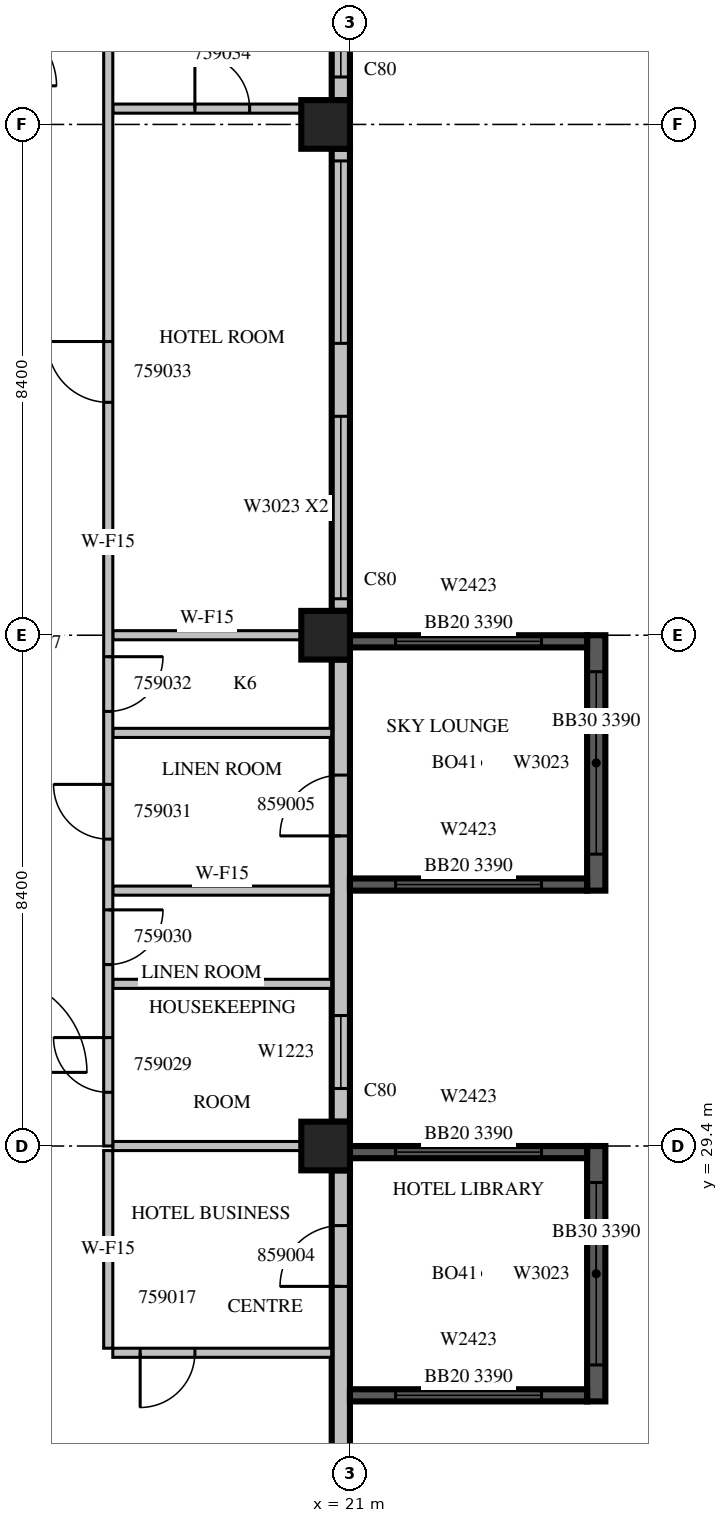
"""IFC4 building model, lengths in metres.
Left out: names, types, materials, properties, quantities, classifications, styles, units other than length and angle.
Written with IfcOpenShell. Run it as: python <this file> out.ifc"""

import sys

from ifc_helpers import new_model, si_unit, direction, frame, frame_2d, origin, origin_2d, place, context, subcontext, project, spatial, rectangle, extrude, source, transform, mapped, element, fill, save


model = new_model("IFC4")
c1 = context("Model", 3, precision=1e-05, world=origin(), true_north=direction((0.0, 1.0)))
c2 = subcontext(c1, "Body", "Model", "MODEL_VIEW")
j1 = project(units=[si_unit("LENGTHUNIT", "METRE"), si_unit("PLANEANGLEUNIT", "RADIAN")], contexts=[c1])
p1 = place(None, origin())
s1 = spatial("IfcSite", under=j1, at=p1, CompositionType="ELEMENT")
p2 = place(p1, origin())
s2 = spatial("IfcBuilding", under=s1, at=p2, CompositionType="ELEMENT")
p3 = place(p2, frame((0.0, 0.0, 257.6)))
s3 = spatial("IfcBuildingStorey", under=s2, at=p3, CompositionType="ELEMENT", Elevation=257.6)
m1 = source(origin(), c2, "Body", "SweptSolid", [
    extrude(rectangle(XDim=0.8, YDim=0.8, at=origin_2d()), origin(), (0.0, 0.0, 1.0), 3.8),
])
for number, where, z_axis, x_axis in (
    (1, (20.6, 29.4, 0.0), (0.0, 0.0, 1.0), (1.0, 0.0, 0.0)),
    (2, (20.6, 37.8, 0.0), (0.0, 0.0, 1.0), (1.0, 0.0, 0.0)),
    (3, (20.6, 46.2, 0.0), (0.0, 0.0, 1.0), (1.0, 0.0, 0.0)),
):
    element("IfcColumn", number, at=place(p3, frame(where, z_axis=z_axis, x_axis=x_axis)), inside=s3, PredefinedType="COLUMN", context=c2, shape_type="MappedRepresentation", body=[
        mapped(m1, transform((0.0, 0.0, 0.0), scale=1.0)),
    ])
m2 = source(origin(), c2, "Body", "SweptSolid", [
    extrude(rectangle(XDim=7.2, YDim=0.3, at=frame_2d((3.6, 0.0))), origin(), (0.0, 0.0, 1.0), 3.4),
])
p4 = place(p3, frame((20.85, 21.8, 0.0), z_axis=(0.0, 0.0, 1.0), x_axis=(0.0, 1.0, 0.0)))
e4 = element("IfcWall", 4, at=p4, inside=s3, PredefinedType="STANDARD", context=c2, shape_type="MappedRepresentation", body=[
    mapped(m2, transform((0.0, 0.0, 0.0), scale=1.0)),
])
m3 = source(origin(), c2, "Body", "SweptSolid", [
    extrude(rectangle(XDim=1.8, YDim=2.3, at=frame_2d((0.9, 1.15))), frame((0.0, 0.16, 0.0), z_axis=(0.0, -1.0, 0.0), x_axis=(1.0, 0.0, 0.0)), (0.0, 0.0, 1.0), 0.32),
])
p5 = place(p4, frame((0.4, 0.0, 0.6)))
e5 = element("IfcOpeningElement", 5, at=p5, cuts=e4, PredefinedType="OPENING", context=c2, shape_type="MappedRepresentation", body=[
    mapped(m3, transform((0.0, 0.0, 0.0), scale=1.0)),
])
m4 = source(origin(), c2, "Body", "SweptSolid", [
    extrude(rectangle(XDim=1.0, YDim=2.1, at=frame_2d((0.5, 1.05))), frame((0.0, 0.16, 0.0), z_axis=(0.0, -1.0, 0.0), x_axis=(1.0, 0.0, 0.0)), (0.0, 0.0, 1.0), 0.32),
])
p6 = place(p4, frame((5.292, 0.0, 0.0)))
e6 = element("IfcOpeningElement", 6, at=p6, cuts=e4, PredefinedType="OPENING", context=c2, shape_type="MappedRepresentation", body=[
    mapped(m4, transform((0.0, 0.0, 0.0), scale=1.0)),
])
m5 = source(origin(), c2, "Body", "SweptSolid", [
    extrude(rectangle(XDim=7.6, YDim=0.3, at=frame_2d((3.8, 0.0))), origin(), (0.0, 0.0, 1.0), 3.4),
])
p7 = place(p3, frame((20.85, 29.8, 0.0), z_axis=(0.0, 0.0, 1.0), x_axis=(0.0, 1.0, 0.0)))
e7 = element("IfcWall", 7, at=p7, inside=s3, PredefinedType="STANDARD", context=c2, shape_type="MappedRepresentation", body=[
    mapped(m5, transform((0.0, 0.0, 0.0), scale=1.0)),
])
m6 = source(origin(), c2, "Body", "SweptSolid", [
    extrude(rectangle(XDim=1.2, YDim=2.3, at=frame_2d((0.6, 1.15))), frame((0.0, 0.16, 0.0), z_axis=(0.0, -1.0, 0.0), x_axis=(1.0, 0.0, 0.0)), (0.0, 0.0, 1.0), 0.32),
])
p8 = place(p7, frame((0.546, 0.0, 0.6)))
e8 = element("IfcOpeningElement", 8, at=p8, cuts=e7, PredefinedType="OPENING", context=c2, shape_type="MappedRepresentation", body=[
    mapped(m6, transform((0.0, 0.0, 0.0), scale=1.0)),
])
p9 = place(p7, frame((4.7, 0.0, 0.0)))
e9 = element("IfcOpeningElement", 9, at=p9, cuts=e7, PredefinedType="OPENING", context=c2, shape_type="MappedRepresentation", body=[
    mapped(m4, transform((0.0, 0.0, 0.0), scale=1.0)),
])
p10 = place(p3, frame((20.85, 38.2, 0.0), z_axis=(0.0, 0.0, 1.0), x_axis=(0.0, 1.0, 0.0)))
e10 = element("IfcWall", 10, at=p10, inside=s3, PredefinedType="STANDARD", context=c2, shape_type="MappedRepresentation", body=[
    mapped(m5, transform((0.0, 0.0, 0.0), scale=1.0)),
])
m7 = source(origin(), c2, "Body", "SweptSolid", [
    extrude(rectangle(XDim=3.0, YDim=2.3, at=frame_2d((1.5, 1.15))), frame((0.0, 0.16, 0.0), z_axis=(0.0, -1.0, 0.0), x_axis=(1.0, 0.0, 0.0)), (0.0, 0.0, 1.0), 0.32),
])
p11 = place(p10, frame((0.2, 0.0, 0.6)))
e11 = element("IfcOpeningElement", 11, at=p11, cuts=e10, PredefinedType="OPENING", context=c2, shape_type="MappedRepresentation", body=[
    mapped(m7, transform((0.0, 0.0, 0.0), scale=1.0)),
])
p12 = place(p10, frame((4.4, 0.0, 0.6)))
e12 = element("IfcOpeningElement", 12, at=p12, cuts=e10, PredefinedType="OPENING", context=c2, shape_type="MappedRepresentation", body=[
    mapped(m7, transform((0.0, 0.0, 0.0), scale=1.0)),
])
m8 = source(origin(), c2, "Body", "SweptSolid", [
    extrude(rectangle(XDim=2.96, YDim=0.3, at=frame_2d((1.48, 0.0))), origin(), (0.0, 0.0, 1.0), 3.4),
])
p13 = place(p3, frame((20.85, 46.6, 0.0), z_axis=(0.0, 0.0, 1.0), x_axis=(0.0, 1.0, 0.0)))
e13 = element("IfcWall", 13, at=p13, inside=s3, PredefinedType="STANDARD", context=c2, shape_type="MappedRepresentation", body=[
    mapped(m8, transform((0.0, 0.0, 0.0), scale=1.0)),
])
p14 = place(p13, frame((0.38, 0.0, 0.6)))
e14 = element("IfcOpeningElement", 14, at=p14, cuts=e13, PredefinedType="OPENING", context=c2, shape_type="MappedRepresentation", body=[
    mapped(m3, transform((0.0, 0.0, 0.0), scale=1.0)),
])
m9 = source(origin(), c2, "Body", "SweptSolid", [
    extrude(rectangle(XDim=4.2, YDim=0.3, at=frame_2d((2.1, 0.0))), origin(), (0.0, 0.0, 1.0), 3.39),
])
p15 = place(p3, frame((25.05, 25.2, 0.0), z_axis=(0.0, 0.0, 1.0), x_axis=(0.0, 1.0, 0.0)))
e15 = element("IfcWall", 15, at=p15, inside=s3, PredefinedType="SOLIDWALL", context=c2, shape_type="MappedRepresentation", body=[
    mapped(m9, transform((0.0, 0.0, 0.0), scale=1.0)),
])
p16 = place(p15, frame((0.6, 0.0, 0.6)))
e16 = element("IfcOpeningElement", 16, at=p16, cuts=e15, PredefinedType="OPENING", context=c2, shape_type="MappedRepresentation", body=[
    mapped(m7, transform((0.0, 0.0, 0.0), scale=1.0)),
])
m10 = source(origin(), c2, "Body", "SweptSolid", [
    extrude(rectangle(XDim=3.9, YDim=0.2, at=frame_2d((1.95, 0.0))), origin(), (0.0, 0.0, 1.0), 3.39),
])
p17 = place(p3, frame((21.0, 25.3, 0.0), z_axis=(0.0, 0.0, 1.0), x_axis=(1.0, 0.0, 0.0)))
e17 = element("IfcWall", 17, at=p17, inside=s3, PredefinedType="SOLIDWALL", context=c2, shape_type="MappedRepresentation", body=[
    mapped(m10, transform((0.0, 0.0, 0.0), scale=1.0)),
])
m11 = source(origin(), c2, "Body", "SweptSolid", [
    extrude(rectangle(XDim=2.4, YDim=2.3, at=frame_2d((1.2, 1.15))), frame((0.0, 0.11, 0.0), z_axis=(0.0, -1.0, 0.0), x_axis=(1.0, 0.0, 0.0)), (0.0, 0.0, 1.0), 0.22),
])
p18 = place(p17, frame((0.75, 0.0, 0.6)))
e18 = element("IfcOpeningElement", 18, at=p18, cuts=e17, PredefinedType="OPENING", context=c2, shape_type="MappedRepresentation", body=[
    mapped(m11, transform((0.0, 0.0, 0.0), scale=1.0)),
])
p19 = place(p3, frame((21.0, 29.3, 0.0), z_axis=(0.0, 0.0, 1.0), x_axis=(1.0, 0.0, 0.0)))
e19 = element("IfcWall", 19, at=p19, inside=s3, PredefinedType="SOLIDWALL", context=c2, shape_type="MappedRepresentation", body=[
    mapped(m10, transform((0.0, 0.0, 0.0), scale=1.0)),
])
p20 = place(p19, frame((0.75, 0.0, 0.6)))
e20 = element("IfcOpeningElement", 20, at=p20, cuts=e19, PredefinedType="OPENING", context=c2, shape_type="MappedRepresentation", body=[
    mapped(m11, transform((0.0, 0.0, 0.0), scale=1.0)),
])
p21 = place(p3, frame((25.05, 33.6, 0.0), z_axis=(0.0, 0.0, 1.0), x_axis=(0.0, 1.0, 0.0)))
e21 = element("IfcWall", 21, at=p21, inside=s3, PredefinedType="SOLIDWALL", context=c2, shape_type="MappedRepresentation", body=[
    mapped(m9, transform((0.0, 0.0, 0.0), scale=1.0)),
])
p22 = place(p21, frame((0.6, 0.0, 0.6)))
e22 = element("IfcOpeningElement", 22, at=p22, cuts=e21, PredefinedType="OPENING", context=c2, shape_type="MappedRepresentation", body=[
    mapped(m7, transform((0.0, 0.0, 0.0), scale=1.0)),
])
p23 = place(p3, frame((21.0, 33.7, 0.0), z_axis=(0.0, 0.0, 1.0), x_axis=(1.0, 0.0, 0.0)))
e23 = element("IfcWall", 23, at=p23, inside=s3, PredefinedType="SOLIDWALL", context=c2, shape_type="MappedRepresentation", body=[
    mapped(m10, transform((0.0, 0.0, 0.0), scale=1.0)),
])
p24 = place(p23, frame((0.75, 0.0, 0.6)))
e24 = element("IfcOpeningElement", 24, at=p24, cuts=e23, PredefinedType="OPENING", context=c2, shape_type="MappedRepresentation", body=[
    mapped(m11, transform((0.0, 0.0, 0.0), scale=1.0)),
])
p25 = place(p3, frame((21.0, 37.7, 0.0), z_axis=(0.0, 0.0, 1.0), x_axis=(1.0, 0.0, 0.0)))
e25 = element("IfcWall", 25, at=p25, inside=s3, PredefinedType="SOLIDWALL", context=c2, shape_type="MappedRepresentation", body=[
    mapped(m10, transform((0.0, 0.0, 0.0), scale=1.0)),
])
p26 = place(p25, frame((0.75, 0.0, 0.6)))
e26 = element("IfcOpeningElement", 26, at=p26, cuts=e25, PredefinedType="OPENING", context=c2, shape_type="MappedRepresentation", body=[
    mapped(m11, transform((0.0, 0.0, 0.0), scale=1.0)),
])
m12 = source(origin(), c2, "Body", "SweptSolid", [
    extrude(rectangle(XDim=3.6, YDim=0.15, at=frame_2d((1.8, 0.0))), origin(), (0.0, 0.0, 1.0), 3.4),
])
p27 = place(p3, frame((17.1, 26.0, 0.0), z_axis=(0.0, 0.0, 1.0), x_axis=(1.0, 0.0, 0.0)))
e27 = element("IfcWall", 27, at=p27, inside=s3, PredefinedType="PARTITIONING", context=c2, shape_type="MappedRepresentation", body=[
    mapped(m12, transform((0.0, 0.0, 0.0), scale=1.0)),
])
m13 = source(origin(), c2, "Body", "SweptSolid", [
    extrude(rectangle(XDim=0.9, YDim=2.1, at=frame_2d((0.45, 1.05))), frame((0.0, 0.085, 0.0), z_axis=(0.0, -1.0, 0.0), x_axis=(1.0, 0.0, 0.0)), (0.0, 0.0, 1.0), 0.17),
])
p28 = place(p27, frame((0.45, 0.0, 0.0)))
e28 = element("IfcOpeningElement", 28, at=p28, cuts=e27, PredefinedType="OPENING", context=c2, shape_type="MappedRepresentation", body=[
    mapped(m13, transform((0.0, 0.0, 0.0), scale=1.0)),
])
m14 = source(origin(), c2, "Body", "SweptSolid", [
    extrude(rectangle(XDim=3.25, YDim=0.15, at=frame_2d((1.625, 0.0))), origin(), (0.0, 0.0, 1.0), 3.4),
])
p29 = place(p3, frame((17.025, 29.325, 0.0), z_axis=(0.0, 0.0, 1.0), x_axis=(0.0, -1.0, 0.0)))
e29 = element("IfcWall", 29, at=p29, inside=s3, PredefinedType="PARTITIONING", context=c2, shape_type="MappedRepresentation", body=[
    mapped(m14, transform((0.0, 0.0, 0.0), scale=1.0)),
])
m15 = source(origin(), c2, "Body", "SweptSolid", [
    extrude(rectangle(XDim=3.101, YDim=0.15, at=frame_2d((1.55, 0.0))), origin(), (0.0, 0.0, 1.0), 3.4),
])
p30 = place(p3, frame((20.201, 29.4, 0.0), z_axis=(0.0, 0.0, 1.0), x_axis=(-1.0, 0.0, 0.0)))
e30 = element("IfcWall", 30, at=p30, inside=s3, PredefinedType="PARTITIONING", context=c2, shape_type="MappedRepresentation", body=[
    mapped(m15, transform((0.0, 0.0, 0.0), scale=1.0)),
])
for number, where, z_axis, x_axis in (
    (31, (17.1, 32.067, 0.0), (0.0, 0.0, 1.0), (1.0, 0.0, 0.0)),
    (32, (17.1, 36.194, 0.0), (0.0, 0.0, 1.0), (1.0, 0.0, 0.0)),
):
    element("IfcWall", number, at=place(p3, frame(where, z_axis=z_axis, x_axis=x_axis)), inside=s3, PredefinedType="PARTITIONING", context=c2, shape_type="MappedRepresentation", body=[
        mapped(m12, transform((0.0, 0.0, 0.0), scale=1.0)),
    ])
p31 = place(p3, frame((17.1, 46.46, 0.0), z_axis=(0.0, 0.0, 1.0), x_axis=(1.0, 0.0, 0.0)))
e33 = element("IfcWall", 33, at=p31, inside=s3, PredefinedType="PARTITIONING", context=c2, shape_type="MappedRepresentation", body=[
    mapped(m15, transform((0.0, 0.0, 0.0), scale=1.0)),
])
p32 = place(p31, frame((1.35, 0.0, 0.0)))
e34 = element("IfcOpeningElement", 34, at=p32, cuts=e33, PredefinedType="OPENING", context=c2, shape_type="MappedRepresentation", body=[
    mapped(m13, transform((0.0, 0.0, 0.0), scale=1.0)),
])
p33 = place(p3, frame((20.7, 33.6, 0.0), z_axis=(0.0, 0.0, 1.0), x_axis=(-1.0, 0.0, 0.0)))
e35 = element("IfcWall", 35, at=p33, inside=s3, PredefinedType="PARTITIONING", context=c2, shape_type="MappedRepresentation", body=[
    mapped(m12, transform((0.0, 0.0, 0.0), scale=1.0)),
])
p34 = place(p3, frame((20.201, 37.8, 0.0), z_axis=(0.0, 0.0, 1.0), x_axis=(-1.0, 0.0, 0.0)))
e36 = element("IfcWall", 36, at=p34, inside=s3, PredefinedType="PARTITIONING", context=c2, shape_type="MappedRepresentation", body=[
    mapped(m15, transform((0.0, 0.0, 0.0), scale=1.0)),
])
m16 = source(origin(), c2, "Body", "SweptSolid", [
    extrude(rectangle(XDim=19.86, YDim=0.15, at=frame_2d((9.93, 0.0))), origin(), (0.0, 0.0, 1.0), 3.4),
])
p35 = place(p3, frame((17.025, 49.26, 0.0), z_axis=(0.0, 0.0, 1.0), x_axis=(0.0, -1.0, 0.0)))
e37 = element("IfcWall", 37, at=p35, inside=s3, PredefinedType="PARTITIONING", context=c2, shape_type="MappedRepresentation", body=[
    mapped(m16, transform((0.0, 0.0, 0.0), scale=1.0)),
])
p36 = place(p35, frame((18.076, 0.0, 0.0)))
e38 = element("IfcOpeningElement", 38, at=p36, cuts=e37, PredefinedType="OPENING", context=c2, shape_type="MappedRepresentation", body=[
    mapped(m13, transform((0.0, 0.0, 0.0), scale=1.0)),
])
p37 = place(p35, frame((15.976, 0.0, 0.0)))
e39 = element("IfcOpeningElement", 39, at=p37, cuts=e37, PredefinedType="OPENING", context=c2, shape_type="MappedRepresentation", body=[
    mapped(m13, transform((0.0, 0.0, 0.0), scale=1.0)),
])
p38 = place(p35, frame((13.913, 0.0, 0.0)))
e40 = element("IfcOpeningElement", 40, at=p38, cuts=e37, PredefinedType="OPENING", context=c2, shape_type="MappedRepresentation", body=[
    mapped(m13, transform((0.0, 0.0, 0.0), scale=1.0)),
])
p39 = place(p35, frame((11.813, 0.0, 0.0)))
e41 = element("IfcOpeningElement", 41, at=p39, cuts=e37, PredefinedType="OPENING", context=c2, shape_type="MappedRepresentation", body=[
    mapped(m13, transform((0.0, 0.0, 0.0), scale=1.0)),
])
m17 = source(origin(), c2, "Body", "SweptSolid", [
    extrude(rectangle(XDim=1.0, YDim=2.1, at=frame_2d((0.5, 1.05))), frame((0.0, 0.085, 0.0), z_axis=(0.0, -1.0, 0.0), x_axis=(1.0, 0.0, 0.0)), (0.0, 0.0, 1.0), 0.17),
])
p40 = place(p35, frame((6.63, 0.0, 0.0)))
e42 = element("IfcOpeningElement", 42, at=p40, cuts=e37, PredefinedType="OPENING", context=c2, shape_type="MappedRepresentation", body=[
    mapped(m17, transform((0.0, 0.0, 0.0), scale=1.0)),
])
m18 = source(origin(), c2, "Body", "SweptSolid", [
    extrude(rectangle(XDim=1.2, YDim=2.3, at=frame_2d((0.6, 1.15))), frame((0.0, 0.03, 0.0), z_axis=(0.0, -1.0, 0.0), x_axis=(1.0, 0.0, 0.0)), (0.0, 0.0, 1.0), 0.06),
])
p41 = place(p8, origin())
e43 = element("IfcWindow", 43, at=p41, inside=s3, PartitioningType="SINGLE_PANEL", PredefinedType="WINDOW", context=c2, shape_type="MappedRepresentation", body=[
    mapped(m18, transform((0.0, 0.0, 0.0), scale=1.0)),
])
fill(e8, e43)
m19 = source(origin(), c2, "Body", "SweptSolid", [
    extrude(rectangle(XDim=3.0, YDim=2.3, at=frame_2d((1.5, 1.15))), frame((0.0, 0.03, 0.0), z_axis=(0.0, -1.0, 0.0), x_axis=(1.0, 0.0, 0.0)), (0.0, 0.0, 1.0), 0.06),
])
p42 = place(p11, origin())
e44 = element("IfcWindow", 44, at=p42, inside=s3, PartitioningType="SINGLE_PANEL", PredefinedType="WINDOW", context=c2, shape_type="MappedRepresentation", body=[
    mapped(m19, transform((0.0, 0.0, 0.0), scale=1.0)),
])
fill(e11, e44)
p43 = place(p12, origin())
e45 = element("IfcWindow", 45, at=p43, inside=s3, PartitioningType="SINGLE_PANEL", PredefinedType="WINDOW", context=c2, shape_type="MappedRepresentation", body=[
    mapped(m19, transform((0.0, 0.0, 0.0), scale=1.0)),
])
fill(e12, e45)
m20 = source(origin(), c2, "Body", "SweptSolid", [
    extrude(rectangle(XDim=1.8, YDim=2.3, at=frame_2d((0.9, 1.15))), frame((0.0, 0.03, 0.0), z_axis=(0.0, -1.0, 0.0), x_axis=(1.0, 0.0, 0.0)), (0.0, 0.0, 1.0), 0.06),
])
p44 = place(p14, origin())
e46 = element("IfcWindow", 46, at=p44, inside=s3, PartitioningType="SINGLE_PANEL", PredefinedType="WINDOW", context=c2, shape_type="MappedRepresentation", body=[
    mapped(m20, transform((0.0, 0.0, 0.0), scale=1.0)),
])
fill(e14, e46)
p45 = place(p16, origin())
e47 = element("IfcWindow", 47, at=p45, inside=s3, PartitioningType="SINGLE_PANEL", PredefinedType="WINDOW", context=c2, shape_type="MappedRepresentation", body=[
    mapped(m19, transform((0.0, 0.0, 0.0), scale=1.0)),
])
fill(e16, e47)
m21 = source(origin(), c2, "Body", "SweptSolid", [
    extrude(rectangle(XDim=2.4, YDim=2.3, at=frame_2d((1.2, 1.15))), frame((0.0, 0.03, 0.0), z_axis=(0.0, -1.0, 0.0), x_axis=(1.0, 0.0, 0.0)), (0.0, 0.0, 1.0), 0.06),
])
p46 = place(p18, origin())
e48 = element("IfcWindow", 48, at=p46, inside=s3, PartitioningType="SINGLE_PANEL", PredefinedType="WINDOW", context=c2, shape_type="MappedRepresentation", body=[
    mapped(m21, transform((0.0, 0.0, 0.0), scale=1.0)),
])
fill(e18, e48)
p47 = place(p20, origin())
e49 = element("IfcWindow", 49, at=p47, inside=s3, PartitioningType="SINGLE_PANEL", PredefinedType="WINDOW", context=c2, shape_type="MappedRepresentation", body=[
    mapped(m21, transform((0.0, 0.0, 0.0), scale=1.0)),
])
fill(e20, e49)
p48 = place(p22, origin())
e50 = element("IfcWindow", 50, at=p48, inside=s3, PartitioningType="SINGLE_PANEL", PredefinedType="WINDOW", context=c2, shape_type="MappedRepresentation", body=[
    mapped(m19, transform((0.0, 0.0, 0.0), scale=1.0)),
])
fill(e22, e50)
p49 = place(p24, origin())
e51 = element("IfcWindow", 51, at=p49, inside=s3, PartitioningType="SINGLE_PANEL", PredefinedType="WINDOW", context=c2, shape_type="MappedRepresentation", body=[
    mapped(m21, transform((0.0, 0.0, 0.0), scale=1.0)),
])
fill(e24, e51)
p50 = place(p26, origin())
e52 = element("IfcWindow", 52, at=p50, inside=s3, PartitioningType="SINGLE_PANEL", PredefinedType="WINDOW", context=c2, shape_type="MappedRepresentation", body=[
    mapped(m21, transform((0.0, 0.0, 0.0), scale=1.0)),
])
fill(e26, e52)
m22 = source(origin(), c2, "Body", "SweptSolid", [
    extrude(rectangle(XDim=0.9, YDim=2.1, at=frame_2d((0.45, 1.05))), frame((0.0, 0.025, 0.0), z_axis=(0.0, -1.0, 0.0), x_axis=(1.0, 0.0, 0.0)), (0.0, 0.0, 1.0), 0.05),
])
p51 = place(p28, origin())
e53 = element("IfcDoor", 53, at=p51, inside=s3, OperationType="SINGLE_SWING_RIGHT", PredefinedType="DOOR", context=c2, shape_type="MappedRepresentation", body=[
    mapped(m22, transform((0.0, 0.0, 0.0), scale=1.0)),
])
fill(e28, e53)
p52 = place(p36, origin())
e54 = element("IfcDoor", 54, at=p52, inside=s3, OperationType="SINGLE_SWING_RIGHT", PredefinedType="DOOR", context=c2, shape_type="MappedRepresentation", body=[
    mapped(m22, transform((0.0, 0.0, 0.0), scale=1.0)),
])
fill(e38, e54)
p53 = place(p37, origin())
e55 = element("IfcDoor", 55, at=p53, inside=s3, OperationType="SINGLE_SWING_LEFT", PredefinedType="DOOR", context=c2, shape_type="MappedRepresentation", body=[
    mapped(m22, transform((0.0, 0.0, 0.0), scale=1.0)),
])
fill(e39, e55)
p54 = place(p38, origin())
e56 = element("IfcDoor", 56, at=p54, inside=s3, OperationType="SINGLE_SWING_RIGHT", PredefinedType="DOOR", context=c2, shape_type="MappedRepresentation", body=[
    mapped(m22, transform((0.0, 0.0, 0.0), scale=1.0)),
])
fill(e40, e56)
p55 = place(p39, origin())
e57 = element("IfcDoor", 57, at=p55, inside=s3, OperationType="SINGLE_SWING_LEFT", PredefinedType="DOOR", context=c2, shape_type="MappedRepresentation", body=[
    mapped(m22, transform((0.0, 0.0, 0.0), scale=1.0)),
])
fill(e41, e57)
m23 = source(origin(), c2, "Body", "SweptSolid", [
    extrude(rectangle(XDim=1.0, YDim=2.1, at=frame_2d((0.5, 1.05))), frame((0.0, 0.025, 0.0), z_axis=(0.0, -1.0, 0.0), x_axis=(1.0, 0.0, 0.0)), (0.0, 0.0, 1.0), 0.05),
])
p56 = place(p40, origin())
e58 = element("IfcDoor", 58, at=p56, inside=s3, OperationType="SINGLE_SWING_RIGHT", PredefinedType="DOOR", context=c2, shape_type="MappedRepresentation", body=[
    mapped(m23, transform((0.0, 0.0, 0.0), scale=1.0)),
])
fill(e42, e58)
p57 = place(p32, origin())
e59 = element("IfcDoor", 59, at=p57, inside=s3, OperationType="SINGLE_SWING_LEFT", PredefinedType="DOOR", context=c2, shape_type="MappedRepresentation", body=[
    mapped(m22, transform((0.0, 0.0, 0.0), scale=1.0)),
])
fill(e34, e59)
p58 = place(p6, origin())
e60 = element("IfcDoor", 60, at=p58, inside=s3, OperationType="SINGLE_SWING_LEFT", PredefinedType="DOOR", context=c2, shape_type="MappedRepresentation", body=[
    mapped(m23, transform((0.0, 0.0, 0.0), scale=1.0)),
])
fill(e6, e60)
p59 = place(p9, origin())
e61 = element("IfcDoor", 61, at=p59, inside=s3, OperationType="SINGLE_SWING_LEFT", PredefinedType="DOOR", context=c2, shape_type="MappedRepresentation", body=[
    mapped(m23, transform((0.0, 0.0, 0.0), scale=1.0)),
])
fill(e9, e61)
save(model, sys.argv[1])
